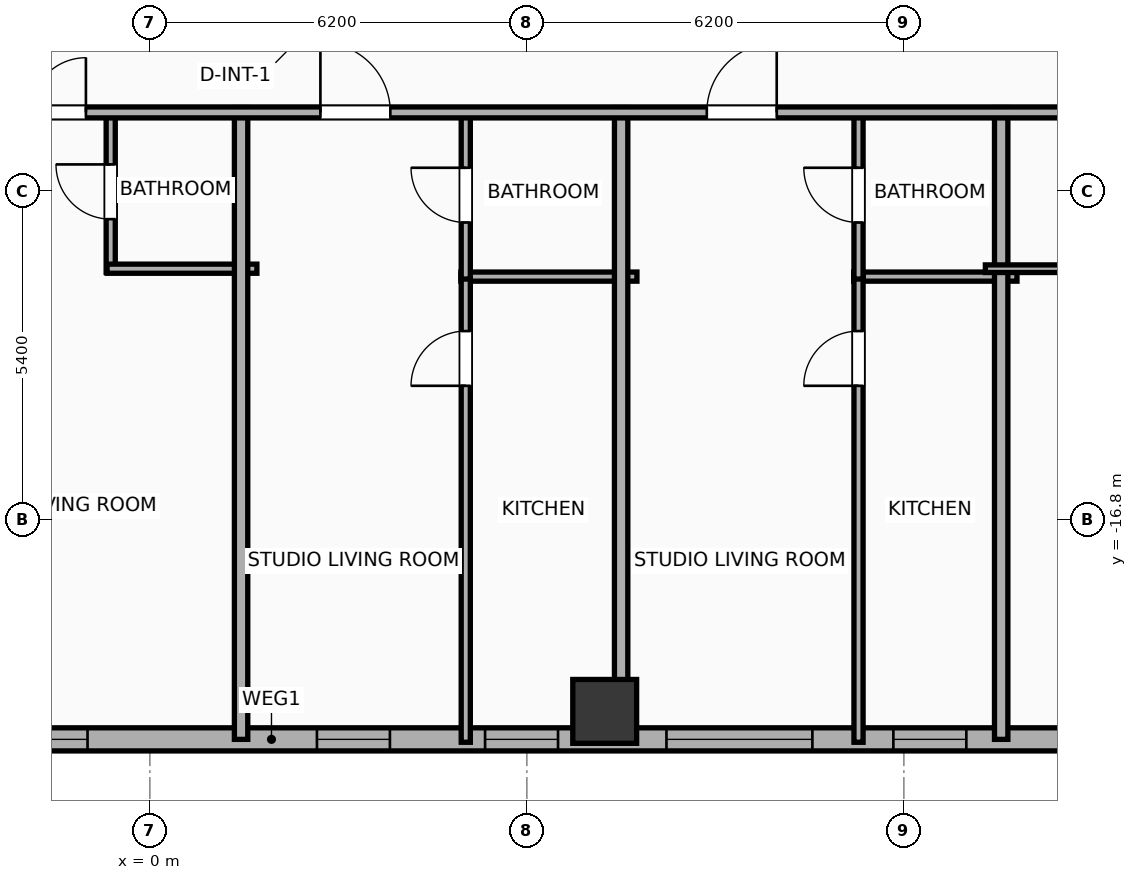
"""IFC4 building model, lengths in metres.
Left out: names, types, materials, properties, quantities, classifications, styles, units other than length and angle.
Written with IfcOpenShell. Run it as: python <this file> out.ifc"""

import sys

from ifc_helpers import new_model, si_unit, direction, frame, frame_2d, origin, origin_2d, place, context, subcontext, project, spatial, rectangle, hollow_rectangle, extrude, element, fill, save


model = new_model("IFC4")
c1 = context("Model", 3, precision=1e-05, world=origin(), true_north=direction((0.0, 1.0)))
c2 = subcontext(c1, "Body", "Model", "MODEL_VIEW")
j1 = project(units=[si_unit("LENGTHUNIT", "METRE"), si_unit("PLANEANGLEUNIT", "RADIAN")], contexts=[c1])
p1 = place(None, origin())
s1 = spatial("IfcSite", under=j1, at=p1, CompositionType="ELEMENT")
p2 = place(p1, origin())
s2 = spatial("IfcBuilding", under=s1, at=p2, CompositionType="ELEMENT")
p3 = place(p2, frame((0.0, 0.0, 124.8)))
s3 = spatial("IfcBuildingStorey", under=s2, at=p3, CompositionType="ELEMENT", Elevation=124.8)
p4 = place(p3, frame((7.48, -19.95, 0.0), z_axis=(0.0, 0.0, 1.0), x_axis=(1.0, 0.0, 0.0)))
e1 = element("IfcColumn", 1, at=p4, inside=s3, PredefinedType="COLUMN", context=c2, shape_type="SweptSolid", body=[
    extrude(hollow_rectangle(XDim=1.05, YDim=1.05, WallThickness=0.036, at=origin_2d()), origin(), (0.0, 0.0, 1.0), 3.9),
])
p5 = place(p3, frame((29.381, -20.41, 0.0), z_axis=(0.0, 0.0, 1.0), x_axis=(-1.0, 0.0, 0.0)))
e2 = element("IfcWall", 2, at=p5, inside=s3, PredefinedType="ELEMENTEDWALL", context=c2, shape_type="SweptSolid", body=[
    extrude(rectangle(XDim=54.763, YDim=0.38, at=frame_2d((27.381, 0.0))), origin(), (0.0, 0.0, 1.0), 3.65),
])
p6 = place(p5, frame((5.645, 0.0, 0.75)))
e3 = element("IfcOpeningElement", 3, at=p6, cuts=e2, PredefinedType="OPENING", context=c2, shape_type="SweptSolid", body=[
    extrude(rectangle(XDim=2.4, YDim=2.1, at=frame_2d((1.2, 1.05))), frame((0.0, 0.2, 0.0), z_axis=(0.0, -1.0, 0.0), x_axis=(1.0, 0.0, 0.0)), (0.0, 0.0, 1.0), 0.4),
])
p7 = place(p5, frame((18.486, 0.0, 0.75)))
e4 = element("IfcOpeningElement", 4, at=p7, cuts=e2, PredefinedType="OPENING", context=c2, shape_type="SweptSolid", body=[
    extrude(rectangle(XDim=2.4, YDim=2.1, at=frame_2d((1.2, 1.05))), frame((0.0, 0.2, 0.0), z_axis=(0.0, -1.0, 0.0), x_axis=(1.0, 0.0, 0.0)), (0.0, 0.0, 1.0), 0.4),
])
p8 = place(p5, frame((34.677, 0.0, 0.75)))
e5 = element("IfcOpeningElement", 5, at=p8, cuts=e2, PredefinedType="OPENING", context=c2, shape_type="SweptSolid", body=[
    extrude(rectangle(XDim=2.4, YDim=2.1, at=frame_2d((1.2, 1.05))), frame((0.0, 0.2, 0.0), z_axis=(0.0, -1.0, 0.0), x_axis=(1.0, 0.0, 0.0)), (0.0, 0.0, 1.0), 0.4),
])
p9 = place(p5, frame((46.717, 0.0, 0.75)))
e6 = element("IfcOpeningElement", 6, at=p9, cuts=e2, PredefinedType="OPENING", context=c2, shape_type="SweptSolid", body=[
    extrude(rectangle(XDim=2.4, YDim=2.1, at=frame_2d((1.2, 1.05))), frame((0.0, 0.2, 0.0), z_axis=(0.0, -1.0, 0.0), x_axis=(1.0, 0.0, 0.0)), (0.0, 0.0, 1.0), 0.4),
])
p10 = place(p5, frame((52.719, 0.0, 0.75)))
e7 = element("IfcOpeningElement", 7, at=p10, cuts=e2, PredefinedType="OPENING", context=c2, shape_type="SweptSolid", body=[
    extrude(rectangle(XDim=1.2, YDim=2.05, at=frame_2d((0.6, 1.025))), frame((0.0, 0.2, 0.0), z_axis=(0.0, -1.0, 0.0), x_axis=(1.0, 0.0, 0.0)), (0.0, 0.0, 1.0), 0.4),
])
p11 = place(p5, frame((50.786, 0.0, 0.75)))
e8 = element("IfcOpeningElement", 8, at=p11, cuts=e2, PredefinedType="OPENING", context=c2, shape_type="SweptSolid", body=[
    extrude(rectangle(XDim=1.2, YDim=2.05, at=frame_2d((0.6, 1.025))), frame((0.0, 0.2, 0.0), z_axis=(0.0, -1.0, 0.0), x_axis=(1.0, 0.0, 0.0)), (0.0, 0.0, 1.0), 0.4),
])
p12 = place(p5, frame((41.858, 0.0, 0.75)))
e9 = element("IfcOpeningElement", 9, at=p12, cuts=e2, PredefinedType="OPENING", context=c2, shape_type="SweptSolid", body=[
    extrude(rectangle(XDim=1.2, YDim=2.05, at=frame_2d((0.6, 1.025))), frame((0.0, 0.2, 0.0), z_axis=(0.0, -1.0, 0.0), x_axis=(1.0, 0.0, 0.0)), (0.0, 0.0, 1.0), 0.4),
])
p13 = place(p5, frame((38.556, 0.0, 0.75)))
e10 = element("IfcOpeningElement", 10, at=p13, cuts=e2, PredefinedType="OPENING", context=c2, shape_type="SweptSolid", body=[
    extrude(rectangle(XDim=1.2, YDim=2.05, at=frame_2d((0.6, 1.025))), frame((0.0, 0.2, 0.0), z_axis=(0.0, -1.0, 0.0), x_axis=(1.0, 0.0, 0.0)), (0.0, 0.0, 1.0), 0.4),
])
p14 = place(p5, frame((30.406, 0.0, 0.75)))
e11 = element("IfcOpeningElement", 11, at=p14, cuts=e2, PredefinedType="OPENING", context=c2, shape_type="SweptSolid", body=[
    extrude(rectangle(XDim=1.2, YDim=2.05, at=frame_2d((0.6, 1.025))), frame((0.0, 0.2, 0.0), z_axis=(0.0, -1.0, 0.0), x_axis=(1.0, 0.0, 0.0)), (0.0, 0.0, 1.0), 0.4),
])
p15 = place(p5, frame((25.434, 0.0, 0.75)))
e12 = element("IfcOpeningElement", 12, at=p15, cuts=e2, PredefinedType="OPENING", context=c2, shape_type="SweptSolid", body=[
    extrude(rectangle(XDim=1.2, YDim=2.05, at=frame_2d((0.6, 1.025))), frame((0.0, 0.2, 0.0), z_axis=(0.0, -1.0, 0.0), x_axis=(1.0, 0.0, 0.0)), (0.0, 0.0, 1.0), 0.4),
])
p16 = place(p5, frame((22.669, 0.0, 0.75)))
e13 = element("IfcOpeningElement", 13, at=p16, cuts=e2, PredefinedType="OPENING", context=c2, shape_type="SweptSolid", body=[
    extrude(rectangle(XDim=1.2, YDim=2.05, at=frame_2d((0.6, 1.025))), frame((0.0, 0.2, 0.0), z_axis=(0.0, -1.0, 0.0), x_axis=(1.0, 0.0, 0.0)), (0.0, 0.0, 1.0), 0.4),
])
p17 = place(p5, frame((15.954, 0.0, 0.75)))
e14 = element("IfcOpeningElement", 14, at=p17, cuts=e2, PredefinedType="OPENING", context=c2, shape_type="SweptSolid", body=[
    extrude(rectangle(XDim=1.2, YDim=2.05, at=frame_2d((0.6, 1.025))), frame((0.0, 0.2, 0.0), z_axis=(0.0, -1.0, 0.0), x_axis=(1.0, 0.0, 0.0)), (0.0, 0.0, 1.0), 0.4),
])
p18 = place(p5, frame((11.698, 0.0, 0.75)))
e15 = element("IfcOpeningElement", 15, at=p18, cuts=e2, PredefinedType="OPENING", context=c2, shape_type="SweptSolid", body=[
    extrude(rectangle(XDim=1.2, YDim=2.05, at=frame_2d((0.6, 1.025))), frame((0.0, 0.2, 0.0), z_axis=(0.0, -1.0, 0.0), x_axis=(1.0, 0.0, 0.0)), (0.0, 0.0, 1.0), 0.4),
])
p19 = place(p5, frame((3.225, 0.0, 0.75)))
e16 = element("IfcOpeningElement", 16, at=p19, cuts=e2, PredefinedType="OPENING", context=c2, shape_type="SweptSolid", body=[
    extrude(rectangle(XDim=1.2, YDim=2.05, at=frame_2d((0.6, 1.025))), frame((0.0, 0.2, 0.0), z_axis=(0.0, -1.0, 0.0), x_axis=(1.0, 0.0, 0.0)), (0.0, 0.0, 1.0), 0.4),
])
p20 = place(p5, frame((1.13, 0.0, 0.75)))
e17 = element("IfcOpeningElement", 17, at=p20, cuts=e2, PredefinedType="OPENING", context=c2, shape_type="SweptSolid", body=[
    extrude(rectangle(XDim=1.2, YDim=2.05, at=frame_2d((0.6, 1.025))), frame((0.0, 0.2, 0.0), z_axis=(0.0, -1.0, 0.0), x_axis=(1.0, 0.0, 0.0)), (0.0, 0.0, 1.0), 0.4),
])
p21 = place(p3, frame((-0.644, -12.73, 0.0), z_axis=(0.0, 0.0, 1.0), x_axis=(0.0, 1.0, 0.0)))
e18 = element("IfcWall", 18, at=p21, inside=s3, PredefinedType="PLUMBINGWALL", context=c2, shape_type="SweptSolid", body=[
    extrude(rectangle(XDim=2.65, YDim=0.15, at=frame_2d((1.325, 0.0))), origin(), (0.0, 0.0, 1.0), 3.65),
])
p22 = place(p21, frame((0.875, 0.0, 0.0)))
e19 = element("IfcOpeningElement", 19, at=p22, cuts=e18, PredefinedType="OPENING", context=c2, shape_type="SweptSolid", body=[
    extrude(rectangle(XDim=0.9, YDim=2.05, at=frame_2d((0.45, 1.025))), frame((0.0, 0.085, 0.0), z_axis=(0.0, -1.0, 0.0), x_axis=(1.0, 0.0, 0.0)), (0.0, 0.0, 1.0), 0.17),
])
p23 = place(p3, frame((-0.704, -12.67, 0.0), z_axis=(0.0, 0.0, 1.0), x_axis=(1.0, 0.0, 0.0)))
e20 = element("IfcWall", 20, at=p23, inside=s3, PredefinedType="PLUMBINGWALL", context=c2, shape_type="SweptSolid", body=[
    extrude(rectangle(XDim=2.464, YDim=0.15, at=frame_2d((1.232, 0.0))), origin(), (0.0, 0.0, 1.0), 3.65),
])
p24 = place(p3, frame((1.5, -20.41, 0.0), z_axis=(0.0, 0.0, 1.0), x_axis=(0.0, 1.0, 0.0)))
e21 = element("IfcWall", 21, at=p24, inside=s3, PredefinedType="PARTITIONING", context=c2, shape_type="SweptSolid", body=[
    extrude(rectangle(XDim=10.39, YDim=0.22, at=frame_2d((5.195, 0.0))), origin(), (0.0, 0.0, 1.0), 3.65),
])
p25 = place(p3, frame((5.115, -12.8, 0.0), z_axis=(0.0, 0.0, 1.0), x_axis=(1.0, 0.0, 0.0)))
e22 = element("IfcWall", 22, at=p25, inside=s3, PredefinedType="PLUMBINGWALL", context=c2, shape_type="SweptSolid", body=[
    extrude(rectangle(XDim=2.895, YDim=0.15, at=frame_2d((1.448, 0.0))), origin(), (0.0, 0.0, 1.0), 3.65),
])
p26 = place(p3, frame((5.195, -20.458, 0.0), z_axis=(0.0, 0.0, 1.0), x_axis=(0.0, 1.0, 0.0)))
e23 = element("IfcWall", 23, at=p26, inside=s3, PredefinedType="PLUMBINGWALL", context=c2, shape_type="SweptSolid", body=[
    extrude(rectangle(XDim=7.698, YDim=0.15, at=frame_2d((3.849, 0.0))), origin(), (0.0, 0.0, 1.0), 3.65),
])
p27 = place(p26, frame((5.862, 0.0, 0.0)))
e24 = element("IfcOpeningElement", 24, at=p27, cuts=e23, PredefinedType="OPENING", context=c2, shape_type="SweptSolid", body=[
    extrude(rectangle(XDim=0.9, YDim=2.05, at=frame_2d((0.45, 1.025))), frame((0.0, 0.085, 0.0), z_axis=(0.0, -1.0, 0.0), x_axis=(1.0, 0.0, 0.0)), (0.0, 0.0, 1.0), 0.17),
])
p28 = place(p3, frame((5.195, -12.84, 0.0), z_axis=(0.0, 0.0, 1.0), x_axis=(0.0, 1.0, 0.0)))
e25 = element("IfcWall", 25, at=p28, inside=s3, PredefinedType="PLUMBINGWALL", context=c2, shape_type="SweptSolid", body=[
    extrude(rectangle(XDim=2.76, YDim=0.15, at=frame_2d((1.38, 0.0))), origin(), (0.0, 0.0, 1.0), 3.04),
])
p29 = place(p28, frame((0.93, 0.0, 0.0)))
e26 = element("IfcOpeningElement", 26, at=p29, cuts=e25, PredefinedType="OPENING", context=c2, shape_type="SweptSolid", body=[
    extrude(rectangle(XDim=0.9, YDim=2.05, at=frame_2d((0.45, 1.025))), frame((0.0, 0.085, 0.0), z_axis=(0.0, -1.0, 0.0), x_axis=(1.0, 0.0, 0.0)), (0.0, 0.0, 1.0), 0.17),
])
p30 = place(p3, frame((7.75, -20.41, 0.0), z_axis=(0.0, 0.0, 1.0), x_axis=(0.0, 1.0, 0.0)))
e27 = element("IfcWall", 27, at=p30, inside=s3, PredefinedType="PARTITIONING", context=c2, shape_type="SweptSolid", body=[
    extrude(rectangle(XDim=10.39, YDim=0.22, at=frame_2d((5.195, 0.0))), origin(), (0.0, 0.0, 1.0), 3.65),
])
p31 = place(p3, frame((11.574, -12.8, 0.0), z_axis=(0.0, 0.0, 1.0), x_axis=(1.0, 0.0, 0.0)))
e28 = element("IfcWall", 28, at=p31, inside=s3, PredefinedType="PLUMBINGWALL", context=c2, shape_type="SweptSolid", body=[
    extrude(rectangle(XDim=2.686, YDim=0.15, at=frame_2d((1.343, 0.0))), origin(), (0.0, 0.0, 1.0), 3.65),
])
p32 = place(p3, frame((11.654, -20.458, 0.0), z_axis=(0.0, 0.0, 1.0), x_axis=(0.0, 1.0, 0.0)))
e29 = element("IfcWall", 29, at=p32, inside=s3, PredefinedType="PLUMBINGWALL", context=c2, shape_type="SweptSolid", body=[
    extrude(rectangle(XDim=7.698, YDim=0.15, at=frame_2d((3.849, 0.0))), origin(), (0.0, 0.0, 1.0), 3.65),
])
p33 = place(p32, frame((5.862, 0.0, 0.0)))
e30 = element("IfcOpeningElement", 30, at=p33, cuts=e29, PredefinedType="OPENING", context=c2, shape_type="SweptSolid", body=[
    extrude(rectangle(XDim=0.9, YDim=2.05, at=frame_2d((0.45, 1.025))), frame((0.0, 0.085, 0.0), z_axis=(0.0, -1.0, 0.0), x_axis=(1.0, 0.0, 0.0)), (0.0, 0.0, 1.0), 0.17),
])
p34 = place(p3, frame((11.654, -12.84, 0.0), z_axis=(0.0, 0.0, 1.0), x_axis=(0.0, 1.0, 0.0)))
e31 = element("IfcWall", 31, at=p34, inside=s3, PredefinedType="PLUMBINGWALL", context=c2, shape_type="SweptSolid", body=[
    extrude(rectangle(XDim=2.76, YDim=0.15, at=frame_2d((1.38, 0.0))), origin(), (0.0, 0.0, 1.0), 3.65),
])
p35 = place(p34, frame((0.93, 0.0, 0.0)))
e32 = element("IfcOpeningElement", 32, at=p35, cuts=e31, PredefinedType="OPENING", context=c2, shape_type="SweptSolid", body=[
    extrude(rectangle(XDim=0.9, YDim=2.05, at=frame_2d((0.45, 1.025))), frame((0.0, 0.085, 0.0), z_axis=(0.0, -1.0, 0.0), x_axis=(1.0, 0.0, 0.0)), (0.0, 0.0, 1.0), 0.17),
])
p36 = place(p3, frame((14.0, -20.41, 0.0), z_axis=(0.0, 0.0, 1.0), x_axis=(0.0, 1.0, 0.0)))
e33 = element("IfcWall", 33, at=p36, inside=s3, PredefinedType="PARTITIONING", context=c2, shape_type="SweptSolid", body=[
    extrude(rectangle(XDim=10.39, YDim=0.22, at=frame_2d((5.195, 0.0))), origin(), (0.0, 0.0, 1.0), 3.65),
])
p37 = place(p3, frame((13.74, -12.67, 0.0), z_axis=(0.0, 0.0, 1.0), x_axis=(1.0, 0.0, 0.0)))
e34 = element("IfcWall", 34, at=p37, inside=s3, PredefinedType="PARTITIONING", context=c2, shape_type="SweptSolid", body=[
    extrude(rectangle(XDim=2.769, YDim=0.125, at=frame_2d((1.385, 0.0))), origin(), (0.0, 0.0, 1.0), 3.65),
])
p38 = place(p3, frame((-29.21, -10.1, 0.0), z_axis=(0.0, 0.0, 1.0), x_axis=(1.0, 0.0, 0.0)))
e35 = element("IfcWall", 35, at=p38, inside=s3, PredefinedType="PARTITIONING", context=c2, shape_type="SweptSolid", body=[
    extrude(rectangle(XDim=62.42, YDim=0.18, at=frame_2d((31.21, 0.0))), origin(), (0.0, 0.0, 1.0), 3.65),
])
p39 = place(p38, frame((2.671, 0.0, 0.0)))
e36 = element("IfcOpeningElement", 36, at=p39, cuts=e35, PredefinedType="OPENING", context=c2, shape_type="SweptSolid", body=[
    extrude(rectangle(XDim=0.9, YDim=2.05, at=frame_2d((0.45, 1.025))), frame((0.0, 0.1, 0.0), z_axis=(0.0, -1.0, 0.0), x_axis=(1.0, 0.0, 0.0)), (0.0, 0.0, 1.0), 0.2),
])
p40 = place(p38, frame((9.637, 0.0, 0.0)))
e37 = element("IfcOpeningElement", 37, at=p40, cuts=e35, PredefinedType="OPENING", context=c2, shape_type="SweptSolid", body=[
    extrude(rectangle(XDim=1.15, YDim=2.05, at=frame_2d((0.575, 1.025))), frame((0.0, 0.1, 0.0), z_axis=(0.0, -1.0, 0.0), x_axis=(1.0, 0.0, 0.0)), (0.0, 0.0, 1.0), 0.2),
])
p41 = place(p38, frame((14.843, 0.0, 0.0)))
e38 = element("IfcOpeningElement", 38, at=p41, cuts=e35, PredefinedType="OPENING", context=c2, shape_type="SweptSolid", body=[
    extrude(rectangle(XDim=0.9, YDim=2.05, at=frame_2d((0.45, 1.025))), frame((0.0, 0.1, 0.0), z_axis=(0.0, -1.0, 0.0), x_axis=(1.0, 0.0, 0.0)), (0.0, 0.0, 1.0), 0.2),
])
p42 = place(p38, frame((21.958, 0.0, 0.0)))
e39 = element("IfcOpeningElement", 39, at=p42, cuts=e35, PredefinedType="OPENING", context=c2, shape_type="SweptSolid", body=[
    extrude(rectangle(XDim=1.15, YDim=2.05, at=frame_2d((0.575, 1.025))), frame((0.0, 0.1, 0.0), z_axis=(0.0, -1.0, 0.0), x_axis=(1.0, 0.0, 0.0)), (0.0, 0.0, 1.0), 0.2),
])
p43 = place(p38, frame((27.258, 0.0, 0.0)))
e40 = element("IfcOpeningElement", 40, at=p43, cuts=e35, PredefinedType="OPENING", context=c2, shape_type="SweptSolid", body=[
    extrude(rectangle(XDim=0.9, YDim=2.05, at=frame_2d((0.45, 1.025))), frame((0.0, 0.1, 0.0), z_axis=(0.0, -1.0, 0.0), x_axis=(1.0, 0.0, 0.0)), (0.0, 0.0, 1.0), 0.2),
])
p44 = place(p38, frame((32.014, 0.0, 0.0)))
e41 = element("IfcOpeningElement", 41, at=p44, cuts=e35, PredefinedType="OPENING", context=c2, shape_type="SweptSolid", body=[
    extrude(rectangle(XDim=1.15, YDim=2.05, at=frame_2d((0.575, 1.025))), frame((0.0, 0.1, 0.0), z_axis=(0.0, -1.0, 0.0), x_axis=(1.0, 0.0, 0.0)), (0.0, 0.0, 1.0), 0.2),
])
p45 = place(p38, frame((38.369, 0.0, 0.0)))
e42 = element("IfcOpeningElement", 42, at=p45, cuts=e35, PredefinedType="OPENING", context=c2, shape_type="SweptSolid", body=[
    extrude(rectangle(XDim=1.15, YDim=2.05, at=frame_2d((0.575, 1.025))), frame((0.0, 0.1, 0.0), z_axis=(0.0, -1.0, 0.0), x_axis=(1.0, 0.0, 0.0)), (0.0, 0.0, 1.0), 0.2),
])
p46 = place(p38, frame((46.09, 0.0, 0.0)))
e43 = element("IfcOpeningElement", 43, at=p46, cuts=e35, PredefinedType="OPENING", context=c2, shape_type="SweptSolid", body=[
    extrude(rectangle(XDim=0.9, YDim=2.05, at=frame_2d((0.45, 1.025))), frame((0.0, 0.1, 0.0), z_axis=(0.0, -1.0, 0.0), x_axis=(1.0, 0.0, 0.0)), (0.0, 0.0, 1.0), 0.2),
])
p47 = place(p38, frame((51.015, 0.0, 0.0)))
e44 = element("IfcOpeningElement", 44, at=p47, cuts=e35, PredefinedType="OPENING", context=c2, shape_type="SweptSolid", body=[
    extrude(rectangle(XDim=1.15, YDim=2.05, at=frame_2d((0.575, 1.025))), frame((0.0, 0.1, 0.0), z_axis=(0.0, -1.0, 0.0), x_axis=(1.0, 0.0, 0.0)), (0.0, 0.0, 1.0), 0.2),
])
p48 = place(p38, frame((58.93, 0.0, 0.0)))
e45 = element("IfcOpeningElement", 45, at=p48, cuts=e35, PredefinedType="OPENING", context=c2, shape_type="SweptSolid", body=[
    extrude(rectangle(XDim=0.9, YDim=2.05, at=frame_2d((0.45, 1.025))), frame((0.0, 0.1, 0.0), z_axis=(0.0, -1.0, 0.0), x_axis=(1.0, 0.0, 0.0)), (0.0, 0.0, 1.0), 0.2),
])
p49 = place(p7, origin())
e46 = element("IfcWindow", 46, at=p49, inside=s3, PartitioningType="SINGLE_PANEL", PredefinedType="WINDOW", context=c2, shape_type="SweptSolid", body=[
    extrude(rectangle(XDim=2.4, YDim=2.1, at=frame_2d((1.2, 1.05))), frame((0.0, 0.03, 0.0), z_axis=(0.0, -1.0, 0.0), x_axis=(1.0, 0.0, 0.0)), (0.0, 0.0, 1.0), 0.06),
])
fill(e4, e46)
p50 = place(p14, origin())
e47 = element("IfcWindow", 47, at=p50, inside=s3, PartitioningType="SINGLE_PANEL", PredefinedType="WINDOW", context=c2, shape_type="SweptSolid", body=[
    extrude(rectangle(XDim=1.2, YDim=2.05, at=frame_2d((0.6, 1.025))), frame((0.0, 0.03, 0.0), z_axis=(0.0, -1.0, 0.0), x_axis=(1.0, 0.0, 0.0)), (0.0, 0.0, 1.0), 0.06),
])
fill(e11, e47)
p51 = place(p15, origin())
e48 = element("IfcWindow", 48, at=p51, inside=s3, PartitioningType="SINGLE_PANEL", PredefinedType="WINDOW", context=c2, shape_type="SweptSolid", body=[
    extrude(rectangle(XDim=1.2, YDim=2.05, at=frame_2d((0.6, 1.025))), frame((0.0, 0.03, 0.0), z_axis=(0.0, -1.0, 0.0), x_axis=(1.0, 0.0, 0.0)), (0.0, 0.0, 1.0), 0.06),
])
fill(e12, e48)
p52 = place(p16, origin())
e49 = element("IfcWindow", 49, at=p52, inside=s3, PartitioningType="SINGLE_PANEL", PredefinedType="WINDOW", context=c2, shape_type="SweptSolid", body=[
    extrude(rectangle(XDim=1.2, YDim=2.05, at=frame_2d((0.6, 1.025))), frame((0.0, 0.03, 0.0), z_axis=(0.0, -1.0, 0.0), x_axis=(1.0, 0.0, 0.0)), (0.0, 0.0, 1.0), 0.06),
])
fill(e13, e49)
p53 = place(p17, origin())
e50 = element("IfcWindow", 50, at=p53, inside=s3, PartitioningType="SINGLE_PANEL", PredefinedType="WINDOW", context=c2, shape_type="SweptSolid", body=[
    extrude(rectangle(XDim=1.2, YDim=2.05, at=frame_2d((0.6, 1.025))), frame((0.0, 0.03, 0.0), z_axis=(0.0, -1.0, 0.0), x_axis=(1.0, 0.0, 0.0)), (0.0, 0.0, 1.0), 0.06),
])
fill(e14, e50)
p54 = place(p22, origin())
e51 = element("IfcDoor", 51, at=p54, inside=s3, OperationType="SINGLE_SWING_RIGHT", PredefinedType="DOOR", context=c2, shape_type="SweptSolid", body=[
    extrude(rectangle(XDim=0.9, YDim=2.05, at=frame_2d((0.45, 1.025))), frame((0.0, 0.025, 0.0), z_axis=(0.0, -1.0, 0.0), x_axis=(1.0, 0.0, 0.0)), (0.0, 0.0, 1.0), 0.05),
])
fill(e19, e51)
p55 = place(p27, origin())
e52 = element("IfcDoor", 52, at=p55, inside=s3, OperationType="SINGLE_SWING_LEFT", PredefinedType="DOOR", context=c2, shape_type="SweptSolid", body=[
    extrude(rectangle(XDim=0.9, YDim=2.05, at=frame_2d((0.45, 1.025))), frame((0.0, 0.025, 0.0), z_axis=(0.0, -1.0, 0.0), x_axis=(1.0, 0.0, 0.0)), (0.0, 0.0, 1.0), 0.05),
])
fill(e24, e52)
p56 = place(p29, origin())
e53 = element("IfcDoor", 53, at=p56, inside=s3, OperationType="SINGLE_SWING_RIGHT", PredefinedType="DOOR", context=c2, shape_type="SweptSolid", body=[
    extrude(rectangle(XDim=0.9, YDim=2.05, at=frame_2d((0.45, 1.025))), frame((0.0, 0.025, 0.0), z_axis=(0.0, -1.0, 0.0), x_axis=(1.0, 0.0, 0.0)), (0.0, 0.0, 1.0), 0.05),
])
fill(e26, e53)
p57 = place(p33, origin())
e54 = element("IfcDoor", 54, at=p57, inside=s3, OperationType="SINGLE_SWING_LEFT", PredefinedType="DOOR", context=c2, shape_type="SweptSolid", body=[
    extrude(rectangle(XDim=0.9, YDim=2.05, at=frame_2d((0.45, 1.025))), frame((0.0, 0.025, 0.0), z_axis=(0.0, -1.0, 0.0), x_axis=(1.0, 0.0, 0.0)), (0.0, 0.0, 1.0), 0.05),
])
fill(e30, e54)
p58 = place(p35, origin())
e55 = element("IfcDoor", 55, at=p58, inside=s3, OperationType="SINGLE_SWING_RIGHT", PredefinedType="DOOR", context=c2, shape_type="SweptSolid", body=[
    extrude(rectangle(XDim=0.9, YDim=2.05, at=frame_2d((0.45, 1.025))), frame((0.0, 0.025, 0.0), z_axis=(0.0, -1.0, 0.0), x_axis=(1.0, 0.0, 0.0)), (0.0, 0.0, 1.0), 0.05),
])
fill(e32, e55)
p59 = place(p43, origin())
e56 = element("IfcDoor", 56, at=p59, inside=s3, OperationType="SINGLE_SWING_RIGHT", PredefinedType="DOOR", context=c2, shape_type="SweptSolid", body=[
    extrude(rectangle(XDim=0.9, YDim=2.05, at=frame_2d((0.45, 1.025))), frame((0.0, 0.025, 0.0), z_axis=(0.0, -1.0, 0.0), x_axis=(1.0, 0.0, 0.0)), (0.0, 0.0, 1.0), 0.05),
])
fill(e40, e56)
p60 = place(p44, origin())
e57 = element("IfcDoor", 57, at=p60, inside=s3, OperationType="SINGLE_SWING_LEFT", PredefinedType="DOOR", context=c2, shape_type="SweptSolid", body=[
    extrude(rectangle(XDim=1.15, YDim=2.05, at=frame_2d((0.575, 1.025))), frame((0.0, 0.025, 0.0), z_axis=(0.0, -1.0, 0.0), x_axis=(1.0, 0.0, 0.0)), (0.0, 0.0, 1.0), 0.05),
])
fill(e41, e57)
p61 = place(p45, origin())
e58 = element("IfcDoor", 58, at=p61, inside=s3, OperationType="SINGLE_SWING_RIGHT", PredefinedType="DOOR", context=c2, shape_type="SweptSolid", body=[
    extrude(rectangle(XDim=1.15, YDim=2.05, at=frame_2d((0.575, 1.025))), frame((0.0, 0.025, 0.0), z_axis=(0.0, -1.0, 0.0), x_axis=(1.0, 0.0, 0.0)), (0.0, 0.0, 1.0), 0.05),
])
fill(e42, e58)
save(model, sys.argv[1])
